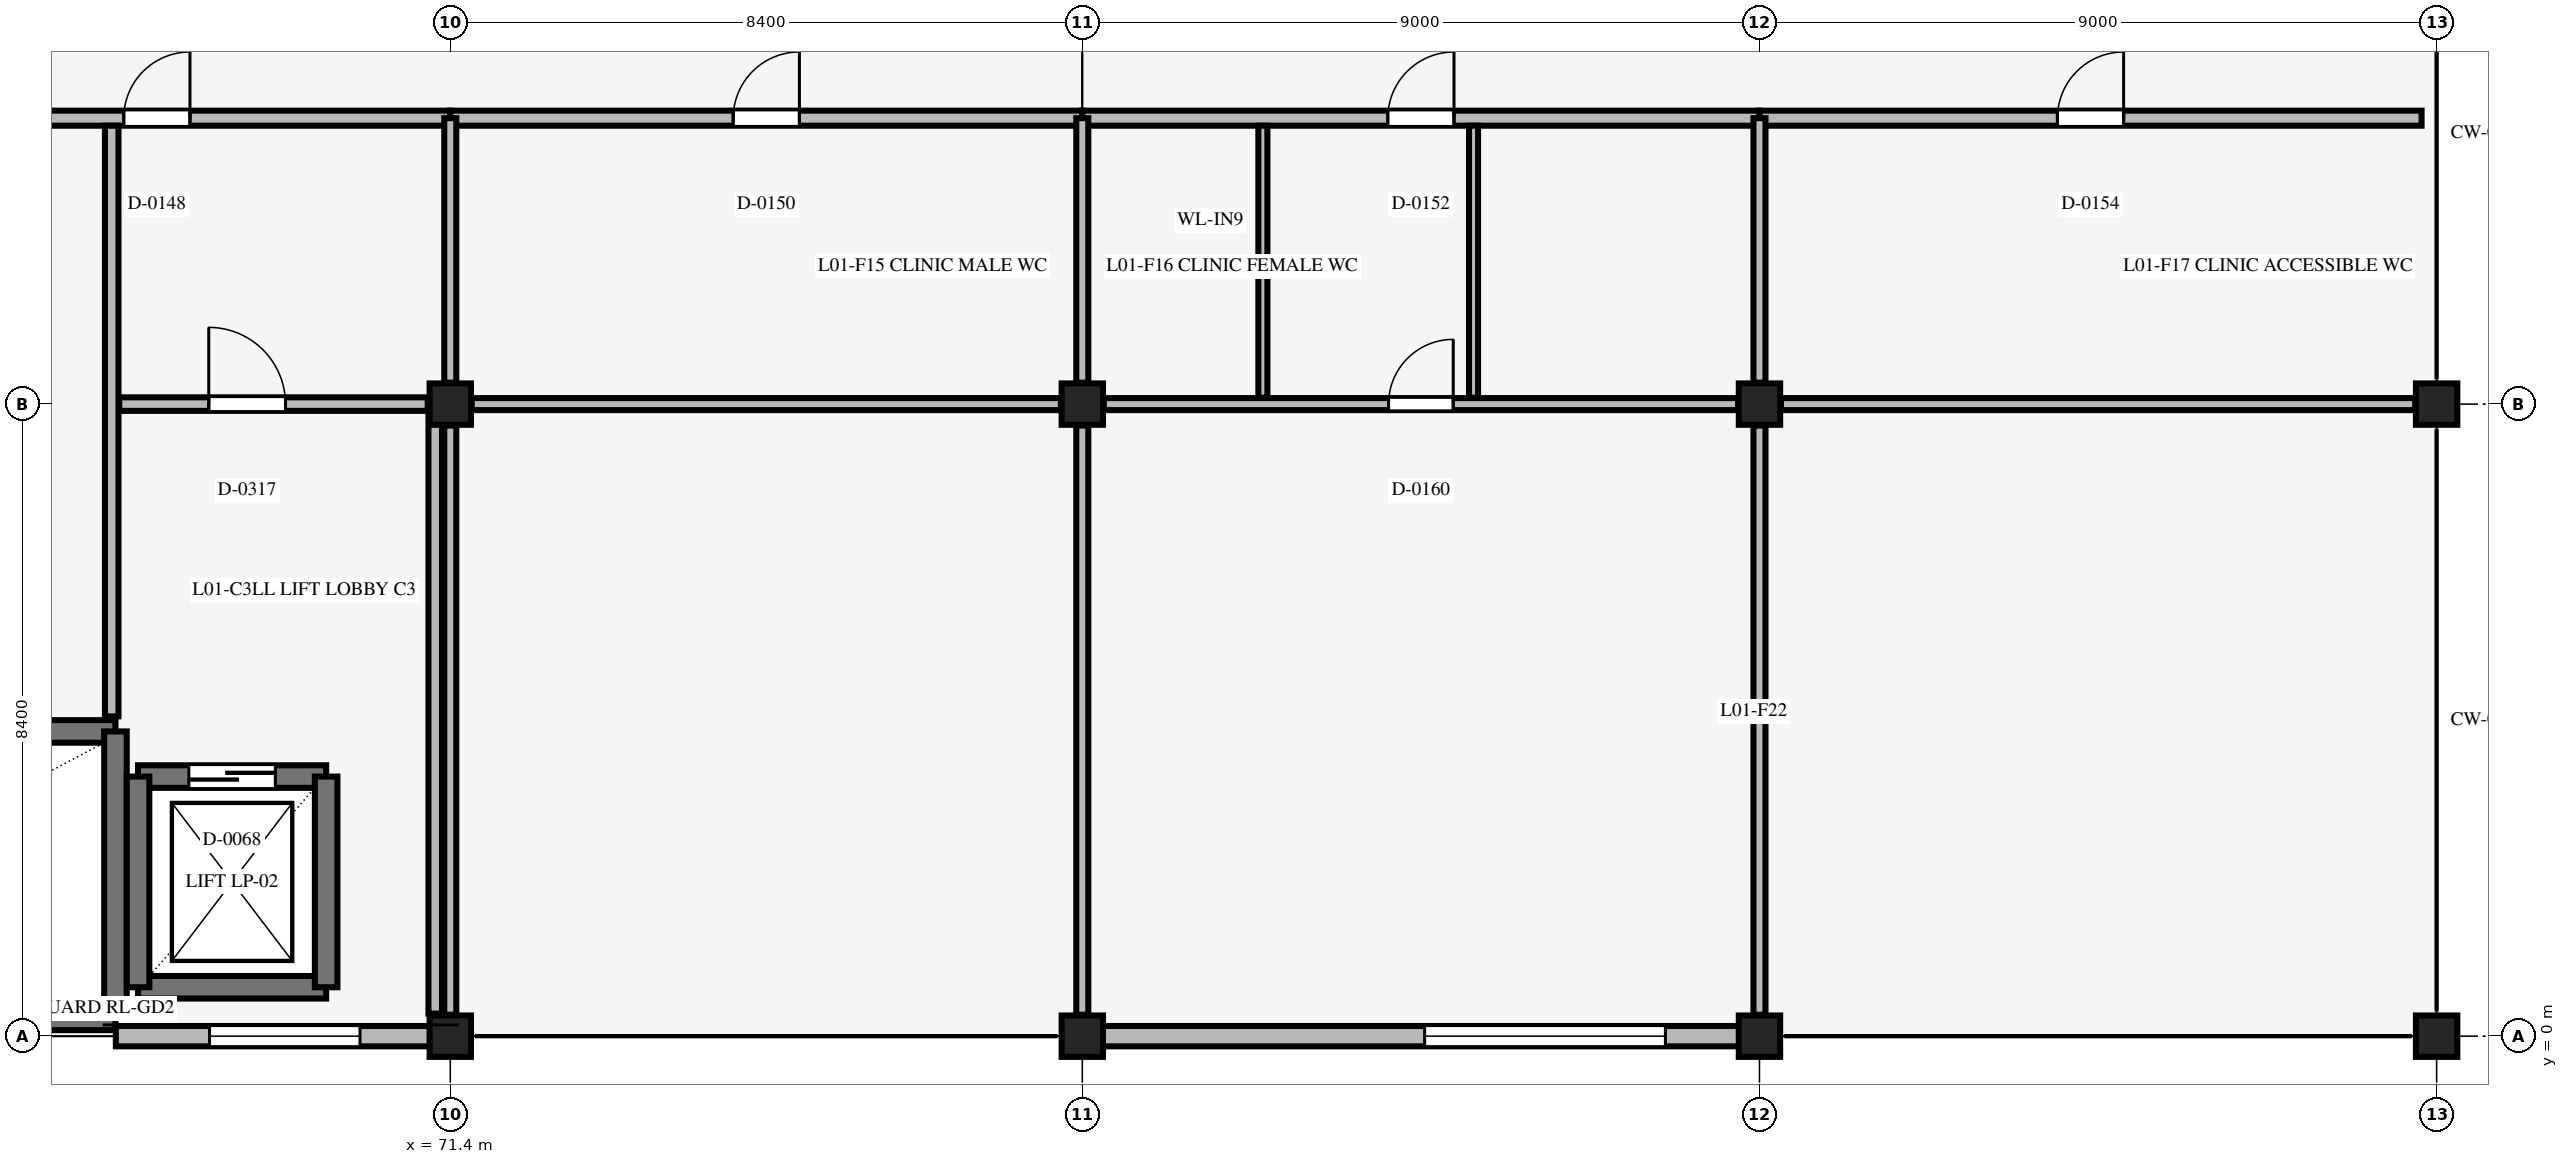
"""IFC4 building model, lengths in metres.
Left out: names, types, materials, properties, quantities, classifications, styles, units other than length and angle.
Written with IfcOpenShell. Run it as: python <this file> out.ifc"""

import sys

from ifc_helpers import new_model, si_unit, direction, frame, frame_2d, origin, origin_2d, place, context, subcontext, project, spatial, rectangle, extrude, element, fill, save


model = new_model("IFC4")
c1 = context("Model", 3, precision=1e-05, world=origin(), true_north=direction((0.0, 1.0)))
c2 = subcontext(c1, "Body", "Model", "MODEL_VIEW")
j1 = project(units=[si_unit("LENGTHUNIT", "METRE"), si_unit("PLANEANGLEUNIT", "RADIAN")], contexts=[c1])
p1 = place(None, origin())
s1 = spatial("IfcSite", under=j1, at=p1, CompositionType="ELEMENT")
p2 = place(p1, origin())
s2 = spatial("IfcBuilding", under=s1, at=p2, CompositionType="ELEMENT")
p3 = place(p2, frame((0.0, 0.0, 6.0)))
s3 = spatial("IfcBuildingStorey", under=s2, at=p3, CompositionType="ELEMENT", Elevation=6.0)
for number, where, z_axis, x_axis in (
    (1, (71.4, 0.0, 0.0), (0.0, 0.0, 1.0), (1.0, 0.0, 0.0)),
    (2, (71.4, 8.4, 0.0), (0.0, 0.0, 1.0), (1.0, 0.0, 0.0)),
    (3, (79.8, 0.0, 0.0), (0.0, 0.0, 1.0), (1.0, 0.0, 0.0)),
    (4, (79.8, 8.4, 0.0), (0.0, 0.0, 1.0), (1.0, 0.0, 0.0)),
    (5, (88.8, 0.0, 0.0), (0.0, 0.0, 1.0), (1.0, 0.0, 0.0)),
    (6, (88.8, 8.4, 0.0), (0.0, 0.0, 1.0), (1.0, 0.0, 0.0)),
    (7, (97.8, 0.0, 0.0), (0.0, 0.0, 1.0), (1.0, 0.0, 0.0)),
    (8, (97.8, 8.4, 0.0), (0.0, 0.0, 1.0), (1.0, 0.0, 0.0)),
):
    element("IfcColumn", number, at=place(p3, frame(where, z_axis=z_axis, x_axis=x_axis)), inside=s3, PredefinedType="COLUMN", context=c2, shape_type="SweptSolid", body=[
        extrude(rectangle(XDim=0.55, YDim=0.55, at=origin_2d()), origin(), (0.0, 0.0, 1.0), 6.0),
    ])
p4 = place(p3, frame((66.95, 0.25, 0.0), z_axis=(0.0, 0.0, 1.0), x_axis=(-1.0, 0.0, 0.0)))
e9 = element("IfcWall", 9, at=p4, inside=s3, PredefinedType="STANDARD", context=c2, shape_type="SweptSolid", body=[
    extrude(rectangle(XDim=9.5, YDim=0.34, at=frame_2d((4.75, 0.0))), origin(), (0.0, 0.0, 1.0), 6.0),
])
p5 = place(p3, frame((57.45, 4.05, 0.0), z_axis=(0.0, 0.0, 1.0), x_axis=(1.0, 0.0, 0.0)))
e10 = element("IfcWall", 10, at=p5, inside=s3, PredefinedType="SHEAR", context=c2, shape_type="SweptSolid", body=[
    extrude(rectangle(XDim=9.5, YDim=0.3, at=frame_2d((4.75, 0.0))), origin(), (0.0, 0.0, 1.0), 6.0),
])
p6 = place(p3, frame((66.95, 0.25, 0.0), z_axis=(0.0, 0.0, 1.0), x_axis=(0.0, 1.0, 0.0)))
e11 = element("IfcWall", 11, at=p6, inside=s3, PredefinedType="SHEAR", context=c2, shape_type="SweptSolid", body=[
    extrude(rectangle(XDim=3.8, YDim=0.3, at=frame_2d((1.9, 0.0))), origin(), (0.0, 0.0, 1.0), 6.0),
])
p7 = place(p3, frame((67.25, 0.65, 0.0), z_axis=(0.0, 0.0, 1.0), x_axis=(1.0, 0.0, 0.0)))
e12 = element("IfcWall", 12, at=p7, inside=s3, PredefinedType="SHEAR", context=c2, shape_type="SweptSolid", body=[
    extrude(rectangle(XDim=2.5, YDim=0.3, at=frame_2d((1.25, 0.0))), origin(), (0.0, 0.0, 1.0), 5.64),
])
p8 = place(p3, frame((67.25, 3.45, 0.0), z_axis=(0.0, 0.0, 1.0), x_axis=(1.0, 0.0, 0.0)))
e13 = element("IfcWall", 13, at=p8, inside=s3, PredefinedType="SHEAR", context=c2, shape_type="SweptSolid", body=[
    extrude(rectangle(XDim=2.5, YDim=0.3, at=frame_2d((1.25, 0.0))), origin(), (0.0, 0.0, 1.0), 5.64),
])
p9 = place(p8, frame((0.675, 0.0, 0.0)))
e14 = element("IfcOpeningElement", 14, at=p9, cuts=e13, PredefinedType="OPENING", context=c2, shape_type="SweptSolid", body=[
    extrude(rectangle(XDim=1.15, YDim=2.2, at=frame_2d((0.575, 1.1))), frame((0.0, 0.16, 0.0), z_axis=(0.0, -1.0, 0.0), x_axis=(1.0, 0.0, 0.0)), (0.0, 0.0, 1.0), 0.32),
])
for number, where, z_axis, x_axis in (
    (15, (67.25, 0.65, 0.0), (0.0, 0.0, 1.0), (0.0, 1.0, 0.0)),
    (16, (69.75, 0.65, 0.0), (0.0, 0.0, 1.0), (0.0, 1.0, 0.0)),
):
    element("IfcWall", number, at=place(p3, frame(where, z_axis=z_axis, x_axis=x_axis)), inside=s3, PredefinedType="SHEAR", context=c2, shape_type="SweptSolid", body=[
        extrude(rectangle(XDim=2.8, YDim=0.3, at=frame_2d((1.4, 0.0))), origin(), (0.0, 0.0, 1.0), 5.64),
    ])
p10 = place(p3, frame((71.135, 0.0, 0.0), z_axis=(0.0, 0.0, 1.0), x_axis=(-1.0, 0.0, 0.0)))
e17 = element("IfcWall", 17, at=p10, inside=s3, PredefinedType="STANDARD", context=c2, shape_type="SweptSolid", body=[
    extrude(rectangle(XDim=4.18, YDim=0.27, at=frame_2d((2.09, 0.0))), origin(), (0.0, 0.0, 1.0), 5.72),
])
p11 = place(p10, frame((0.935, 0.0, 1.2)))
e18 = element("IfcOpeningElement", 18, at=p11, cuts=e17, PredefinedType="OPENING", context=c2, shape_type="SweptSolid", body=[
    extrude(rectangle(XDim=2.0, YDim=0.9, at=frame_2d((1.0, 0.45))), frame((0.0, 0.145, 0.0), z_axis=(0.0, -1.0, 0.0), x_axis=(1.0, 0.0, 0.0)), (0.0, 0.0, 1.0), 0.29),
])
p12 = place(p3, frame((88.535, 0.0, 0.0), z_axis=(0.0, 0.0, 1.0), x_axis=(-1.0, 0.0, 0.0)))
e19 = element("IfcWall", 19, at=p12, inside=s3, PredefinedType="STANDARD", context=c2, shape_type="SweptSolid", body=[
    extrude(rectangle(XDim=8.47, YDim=0.27, at=frame_2d((4.235, 0.0))), origin(), (0.0, 0.0, 1.0), 5.371),
])
p13 = place(p12, frame((0.985, 0.0, 0.9)))
e20 = element("IfcOpeningElement", 20, at=p13, cuts=e19, PredefinedType="OPENING", context=c2, shape_type="SweptSolid", body=[
    extrude(rectangle(XDim=3.2, YDim=2.1, at=frame_2d((1.6, 1.05))), frame((0.0, 0.145, 0.0), z_axis=(0.0, -1.0, 0.0), x_axis=(1.0, 0.0, 0.0)), (0.0, 0.0, 1.0), 0.29),
])
p14 = place(p3, frame((63.0, 12.2, 0.0), z_axis=(0.0, 0.0, 1.0), x_axis=(1.0, 0.0, 0.0)))
e21 = element("IfcWall", 21, at=p14, inside=s3, PredefinedType="STANDARD", context=c2, shape_type="SweptSolid", body=[
    extrude(rectangle(XDim=8.4, YDim=0.2, at=frame_2d((4.2, 0.0))), origin(), (0.0, 0.0, 1.0), 3.15),
])
p15 = place(p14, frame((4.06, 0.0, 0.0)))
e22 = element("IfcOpeningElement", 22, at=p15, cuts=e21, PredefinedType="OPENING", context=c2, shape_type="SweptSolid", body=[
    extrude(rectangle(XDim=0.88, YDim=2.1, at=frame_2d((0.44, 1.05))), frame((0.0, 0.11, 0.0), z_axis=(0.0, -1.0, 0.0), x_axis=(1.0, 0.0, 0.0)), (0.0, 0.0, 1.0), 0.22),
])
p16 = place(p3, frame((71.4, 12.2, 0.0), z_axis=(0.0, 0.0, 1.0), x_axis=(1.0, 0.0, 0.0)))
e23 = element("IfcWall", 23, at=p16, inside=s3, PredefinedType="STANDARD", context=c2, shape_type="SweptSolid", body=[
    extrude(rectangle(XDim=8.4, YDim=0.2, at=frame_2d((4.2, 0.0))), origin(), (0.0, 0.0, 1.0), 3.15),
])
p17 = place(p16, frame((3.76, 0.0, 0.0)))
e24 = element("IfcOpeningElement", 24, at=p17, cuts=e23, PredefinedType="OPENING", context=c2, shape_type="SweptSolid", body=[
    extrude(rectangle(XDim=0.88, YDim=2.1, at=frame_2d((0.44, 1.05))), frame((0.0, 0.11, 0.0), z_axis=(0.0, -1.0, 0.0), x_axis=(1.0, 0.0, 0.0)), (0.0, 0.0, 1.0), 0.22),
])
p18 = place(p3, frame((79.8, 12.2, 0.0), z_axis=(0.0, 0.0, 1.0), x_axis=(1.0, 0.0, 0.0)))
e25 = element("IfcWall", 25, at=p18, inside=s3, PredefinedType="STANDARD", context=c2, shape_type="SweptSolid", body=[
    extrude(rectangle(XDim=9.0, YDim=0.2, at=frame_2d((4.5, 0.0))), origin(), (0.0, 0.0, 1.0), 3.15),
])
p19 = place(p18, frame((4.06, 0.0, 0.0)))
e26 = element("IfcOpeningElement", 26, at=p19, cuts=e25, PredefinedType="OPENING", context=c2, shape_type="SweptSolid", body=[
    extrude(rectangle(XDim=0.88, YDim=2.1, at=frame_2d((0.44, 1.05))), frame((0.0, 0.11, 0.0), z_axis=(0.0, -1.0, 0.0), x_axis=(1.0, 0.0, 0.0)), (0.0, 0.0, 1.0), 0.22),
])
p20 = place(p3, frame((88.8, 12.2, 0.0), z_axis=(0.0, 0.0, 1.0), x_axis=(1.0, 0.0, 0.0)))
e27 = element("IfcWall", 27, at=p20, inside=s3, PredefinedType="STANDARD", context=c2, shape_type="SweptSolid", body=[
    extrude(rectangle(XDim=8.8, YDim=0.2, at=frame_2d((4.4, 0.0))), origin(), (0.0, 0.0, 1.0), 3.15),
])
p21 = place(p20, frame((3.96, 0.0, 0.0)))
e28 = element("IfcOpeningElement", 28, at=p21, cuts=e27, PredefinedType="OPENING", context=c2, shape_type="SweptSolid", body=[
    extrude(rectangle(XDim=0.88, YDim=2.1, at=frame_2d((0.44, 1.05))), frame((0.0, 0.11, 0.0), z_axis=(0.0, -1.0, 0.0), x_axis=(1.0, 0.0, 0.0)), (0.0, 0.0, 1.0), 0.22),
])
p22 = place(p3, frame((71.4, 0.285, 0.0), z_axis=(0.0, 0.0, 1.0), x_axis=(0.0, 1.0, 0.0)))
e29 = element("IfcWall", 29, at=p22, inside=s3, PredefinedType="STANDARD", context=c2, shape_type="SweptSolid", body=[
    extrude(rectangle(XDim=7.83, YDim=0.16, at=frame_2d((3.915, 0.0))), origin(), (0.0, 0.0, 1.0), 3.15),
])
p23 = place(p3, frame((71.4, 8.685, 0.0), z_axis=(0.0, 0.0, 1.0), x_axis=(0.0, 1.0, 0.0)))
e30 = element("IfcWall", 30, at=p23, inside=s3, PredefinedType="STANDARD", context=c2, shape_type="SweptSolid", body=[
    extrude(rectangle(XDim=3.515, YDim=0.16, at=frame_2d((1.757, 0.0))), origin(), (0.0, 0.0, 1.0), 3.15),
])
p24 = place(p3, frame((79.8, 0.285, 0.0), z_axis=(0.0, 0.0, 1.0), x_axis=(0.0, 1.0, 0.0)))
e31 = element("IfcWall", 31, at=p24, inside=s3, PredefinedType="STANDARD", context=c2, shape_type="SweptSolid", body=[
    extrude(rectangle(XDim=7.83, YDim=0.16, at=frame_2d((3.915, 0.0))), origin(), (0.0, 0.0, 1.0), 3.15),
])
p25 = place(p3, frame((79.8, 8.685, 0.0), z_axis=(0.0, 0.0, 1.0), x_axis=(0.0, 1.0, 0.0)))
e32 = element("IfcWall", 32, at=p25, inside=s3, PredefinedType="STANDARD", context=c2, shape_type="SweptSolid", body=[
    extrude(rectangle(XDim=3.515, YDim=0.16, at=frame_2d((1.757, 0.0))), origin(), (0.0, 0.0, 1.0), 3.15),
])
p26 = place(p3, frame((88.8, 0.285, 0.0), z_axis=(0.0, 0.0, 1.0), x_axis=(0.0, 1.0, 0.0)))
e33 = element("IfcWall", 33, at=p26, inside=s3, PredefinedType="STANDARD", context=c2, shape_type="SweptSolid", body=[
    extrude(rectangle(XDim=7.83, YDim=0.16, at=frame_2d((3.915, 0.0))), origin(), (0.0, 0.0, 1.0), 3.15),
])
p27 = place(p3, frame((88.8, 8.685, 0.0), z_axis=(0.0, 0.0, 1.0), x_axis=(0.0, 1.0, 0.0)))
e34 = element("IfcWall", 34, at=p27, inside=s3, PredefinedType="STANDARD", context=c2, shape_type="SweptSolid", body=[
    extrude(rectangle(XDim=3.515, YDim=0.16, at=frame_2d((1.757, 0.0))), origin(), (0.0, 0.0, 1.0), 3.15),
])
p28 = place(p3, frame((71.685, 8.4, 0.0), z_axis=(0.0, 0.0, 1.0), x_axis=(1.0, 0.0, 0.0)))
e35 = element("IfcWall", 35, at=p28, inside=s3, PredefinedType="STANDARD", context=c2, shape_type="SweptSolid", body=[
    extrude(rectangle(XDim=7.83, YDim=0.16, at=frame_2d((3.915, 0.0))), origin(), (0.0, 0.0, 1.0), 3.15),
])
p29 = place(p3, frame((80.085, 8.4, 0.0), z_axis=(0.0, 0.0, 1.0), x_axis=(1.0, 0.0, 0.0)))
e36 = element("IfcWall", 36, at=p29, inside=s3, PredefinedType="STANDARD", context=c2, shape_type="SweptSolid", body=[
    extrude(rectangle(XDim=8.43, YDim=0.16, at=frame_2d((4.215, 0.0))), origin(), (0.0, 0.0, 1.0), 3.15),
])
p30 = place(p29, frame((3.785, 0.0, 0.0)))
e37 = element("IfcOpeningElement", 37, at=p30, cuts=e36, PredefinedType="OPENING", context=c2, shape_type="SweptSolid", body=[
    extrude(rectangle(XDim=0.86, YDim=2.1, at=frame_2d((0.43, 1.05))), frame((0.0, 0.09, 0.0), z_axis=(0.0, -1.0, 0.0), x_axis=(1.0, 0.0, 0.0)), (0.0, 0.0, 1.0), 0.18),
])
p31 = place(p3, frame((89.085, 8.4, 0.0), z_axis=(0.0, 0.0, 1.0), x_axis=(1.0, 0.0, 0.0)))
e38 = element("IfcWall", 38, at=p31, inside=s3, PredefinedType="STANDARD", context=c2, shape_type="SweptSolid", body=[
    extrude(rectangle(XDim=8.43, YDim=0.16, at=frame_2d((4.215, 0.0))), origin(), (0.0, 0.0, 1.0), 3.15),
])
for number, where, z_axis, x_axis in (
    (39, (82.2, 8.485, 0.0), (0.0, 0.0, 1.0), (0.0, 1.0, 0.0)),
    (40, (85.0, 8.485, 0.0), (0.0, 0.0, 1.0), (0.0, 1.0, 0.0)),
):
    element("IfcWall", number, at=place(p3, frame(where, z_axis=z_axis, x_axis=x_axis)), inside=s3, PredefinedType="STANDARD", context=c2, shape_type="SweptSolid", body=[
        extrude(rectangle(XDim=3.615, YDim=0.12, at=frame_2d((1.808, 0.0))), origin(), (0.0, 0.0, 1.0), 3.15),
    ])
p32 = place(p3, frame((66.9, 4.25, 0.0), z_axis=(0.0, 0.0, 1.0), x_axis=(0.0, 1.0, 0.0)))
e41 = element("IfcWall", 41, at=p32, inside=s3, PredefinedType="STANDARD", context=c2, shape_type="SweptSolid", body=[
    extrude(rectangle(XDim=7.85, YDim=0.18, at=frame_2d((3.925, 0.0))), origin(), (0.0, 0.0, 1.0), 3.15),
])
p33 = place(p3, frame((67.0, 8.4, 0.0), z_axis=(0.0, 0.0, 1.0), x_axis=(1.0, 0.0, 0.0)))
e42 = element("IfcWall", 42, at=p33, inside=s3, PredefinedType="STANDARD", context=c2, shape_type="SweptSolid", body=[
    extrude(rectangle(XDim=4.1, YDim=0.18, at=frame_2d((2.05, 0.0))), origin(), (0.0, 0.0, 1.0), 3.15),
])
p34 = place(p33, frame((1.19, 0.0, 0.0)))
e43 = element("IfcOpeningElement", 43, at=p34, cuts=e42, PredefinedType="OPENING", context=c2, shape_type="SweptSolid", body=[
    extrude(rectangle(XDim=1.02, YDim=2.15, at=frame_2d((0.51, 1.075))), frame((0.0, 0.1, 0.0), z_axis=(0.0, -1.0, 0.0), x_axis=(1.0, 0.0, 0.0)), (0.0, 0.0, 1.0), 0.2),
])
p35 = place(p3, frame((71.2, 0.3, 0.0), z_axis=(0.0, 0.0, 1.0), x_axis=(0.0, 1.0, 0.0)))
e44 = element("IfcWall", 44, at=p35, inside=s3, PredefinedType="STANDARD", context=c2, shape_type="SweptSolid", body=[
    extrude(rectangle(XDim=8.1, YDim=0.18, at=frame_2d((4.05, 0.0))), origin(), (0.0, 0.0, 1.0), 3.15),
])
p36 = place(p11, origin())
e45 = element("IfcWindow", 45, at=p36, inside=s3, PartitioningType="SINGLE_PANEL", PredefinedType="WINDOW", context=c2, shape_type="SweptSolid", body=[
    extrude(rectangle(XDim=2.0, YDim=0.9, at=frame_2d((1.0, 0.45))), frame((0.0, 0.03, 0.0), z_axis=(0.0, -1.0, 0.0), x_axis=(1.0, 0.0, 0.0)), (0.0, 0.0, 1.0), 0.06),
])
fill(e18, e45)
p37 = place(p13, origin())
e46 = element("IfcWindow", 46, at=p37, inside=s3, PartitioningType="SINGLE_PANEL", PredefinedType="WINDOW", context=c2, shape_type="SweptSolid", body=[
    extrude(rectangle(XDim=3.2, YDim=2.1, at=frame_2d((1.6, 1.05))), frame((0.0, 0.03, 0.0), z_axis=(0.0, -1.0, 0.0), x_axis=(1.0, 0.0, 0.0)), (0.0, 0.0, 1.0), 0.06),
])
fill(e20, e46)
p38 = place(p9, origin())
e47 = element("IfcDoor", 47, at=p38, inside=s3, OperationType="DOUBLE_DOOR_SLIDING", PredefinedType="DOOR", context=c2, shape_type="SweptSolid", body=[
    extrude(rectangle(XDim=1.15, YDim=2.2, at=frame_2d((0.575, 1.1))), frame((0.0, 0.025, 0.0), z_axis=(0.0, -1.0, 0.0), x_axis=(1.0, 0.0, 0.0)), (0.0, 0.0, 1.0), 0.05),
])
fill(e14, e47)
p39 = place(p15, origin())
e48 = element("IfcDoor", 48, at=p39, inside=s3, OperationType="SINGLE_SWING_RIGHT", PredefinedType="DOOR", context=c2, shape_type="SweptSolid", body=[
    extrude(rectangle(XDim=0.88, YDim=2.1, at=frame_2d((0.44, 1.05))), frame((0.0, 0.025, 0.0), z_axis=(0.0, -1.0, 0.0), x_axis=(1.0, 0.0, 0.0)), (0.0, 0.0, 1.0), 0.05),
])
fill(e22, e48)
p40 = place(p17, origin())
e49 = element("IfcDoor", 49, at=p40, inside=s3, OperationType="SINGLE_SWING_RIGHT", PredefinedType="DOOR", context=c2, shape_type="SweptSolid", body=[
    extrude(rectangle(XDim=0.88, YDim=2.1, at=frame_2d((0.44, 1.05))), frame((0.0, 0.025, 0.0), z_axis=(0.0, -1.0, 0.0), x_axis=(1.0, 0.0, 0.0)), (0.0, 0.0, 1.0), 0.05),
])
fill(e24, e49)
p41 = place(p19, origin())
e50 = element("IfcDoor", 50, at=p41, inside=s3, OperationType="SINGLE_SWING_RIGHT", PredefinedType="DOOR", context=c2, shape_type="SweptSolid", body=[
    extrude(rectangle(XDim=0.88, YDim=2.1, at=frame_2d((0.44, 1.05))), frame((0.0, 0.025, 0.0), z_axis=(0.0, -1.0, 0.0), x_axis=(1.0, 0.0, 0.0)), (0.0, 0.0, 1.0), 0.05),
])
fill(e26, e50)
p42 = place(p21, origin())
e51 = element("IfcDoor", 51, at=p42, inside=s3, OperationType="SINGLE_SWING_RIGHT", PredefinedType="DOOR", context=c2, shape_type="SweptSolid", body=[
    extrude(rectangle(XDim=0.88, YDim=2.1, at=frame_2d((0.44, 1.05))), frame((0.0, 0.025, 0.0), z_axis=(0.0, -1.0, 0.0), x_axis=(1.0, 0.0, 0.0)), (0.0, 0.0, 1.0), 0.05),
])
fill(e28, e51)
p43 = place(p30, origin())
e52 = element("IfcDoor", 52, at=p43, inside=s3, OperationType="SINGLE_SWING_RIGHT", PredefinedType="DOOR", context=c2, shape_type="SweptSolid", body=[
    extrude(rectangle(XDim=0.86, YDim=2.1, at=frame_2d((0.43, 1.05))), frame((0.0, 0.025, 0.0), z_axis=(0.0, -1.0, 0.0), x_axis=(1.0, 0.0, 0.0)), (0.0, 0.0, 1.0), 0.05),
])
fill(e37, e52)
p44 = place(p34, origin())
e53 = element("IfcDoor", 53, at=p44, inside=s3, OperationType="SINGLE_SWING_LEFT", PredefinedType="DOOR", context=c2, shape_type="SweptSolid", body=[
    extrude(rectangle(XDim=1.02, YDim=2.15, at=frame_2d((0.51, 1.075))), frame((0.0, 0.025, 0.0), z_axis=(0.0, -1.0, 0.0), x_axis=(1.0, 0.0, 0.0)), (0.0, 0.0, 1.0), 0.05),
])
fill(e43, e53)
save(model, sys.argv[1])
